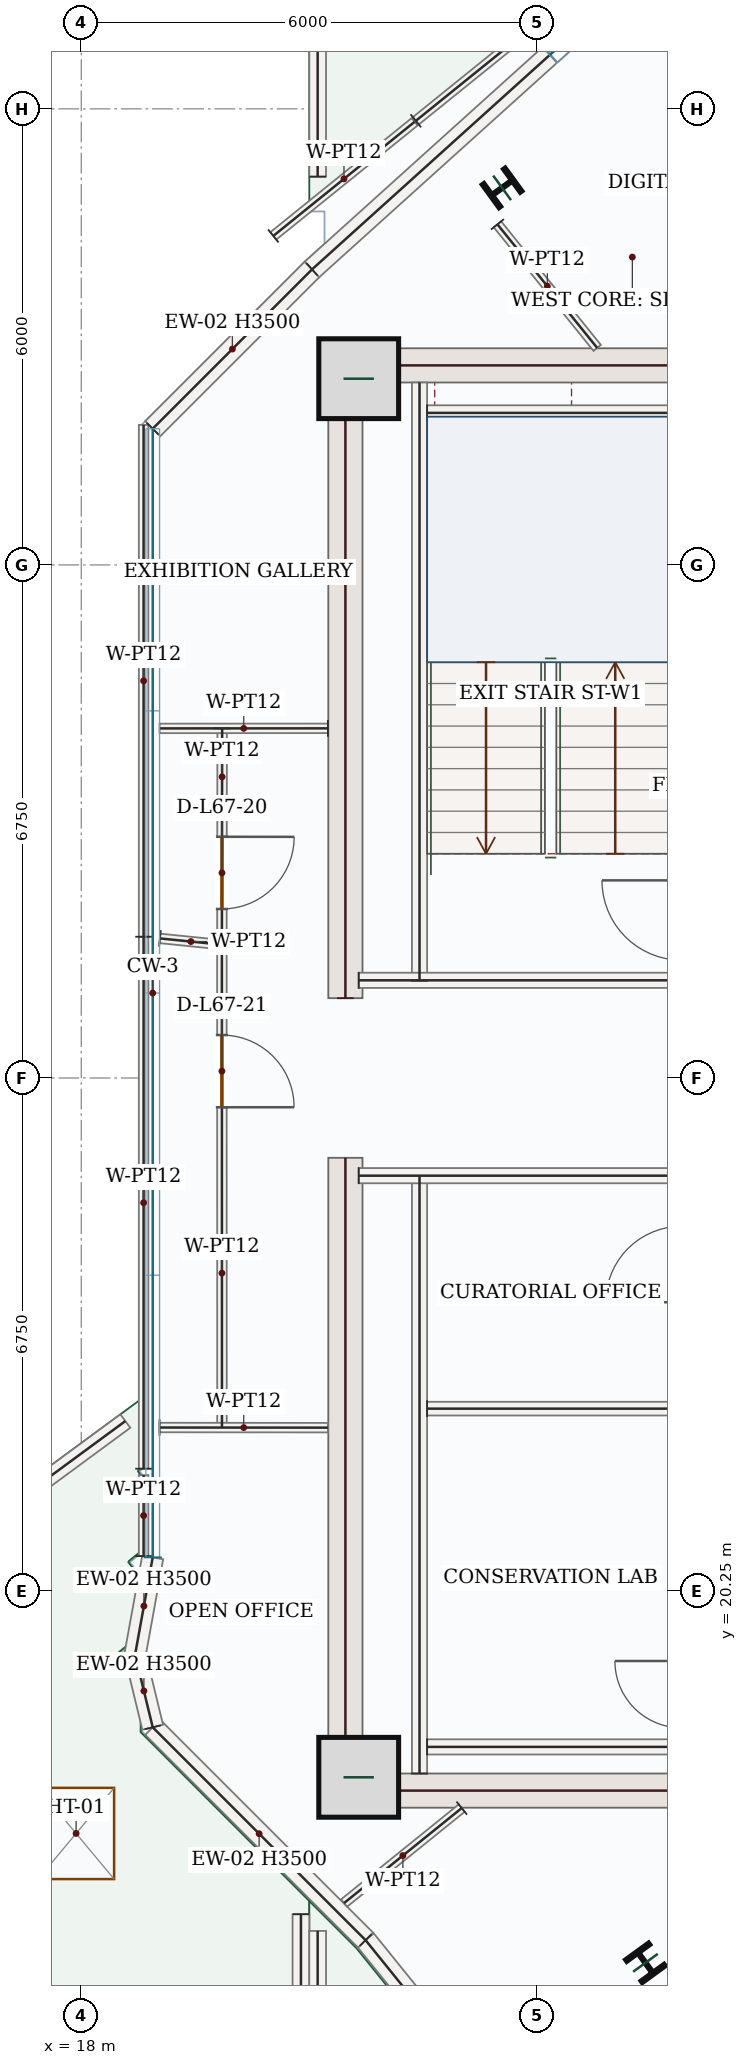
"""IFC4 building model, lengths in metres.
Left out: names, types, materials, properties, quantities, classifications, styles, units other than length and angle.
Written with IfcOpenShell. Run it as: python <this file> out.ifc"""

import sys

from ifc_helpers import new_model, si_unit, direction, frame, frame_2d, origin, origin_2d, place, context, subcontext, project, spatial, rectangle, i_section, extrude, source, transform, mapped, element, fill, save


model = new_model("IFC4")
c1 = context("Model", 3, precision=1e-05, world=origin(), true_north=direction((0.0, 1.0)))
c2 = subcontext(c1, "Body", "Model", "MODEL_VIEW")
j1 = project(units=[si_unit("LENGTHUNIT", "METRE"), si_unit("PLANEANGLEUNIT", "RADIAN")], contexts=[c1])
p1 = place(None, origin())
s1 = spatial("IfcSite", under=j1, at=p1, CompositionType="ELEMENT")
p2 = place(p1, origin())
s2 = spatial("IfcBuilding", under=s1, at=p2, CompositionType="ELEMENT")
p3 = place(p2, frame((0.0, 0.0, 280.35)))
s3 = spatial("IfcBuildingStorey", under=s2, at=p3, CompositionType="ELEMENT", Elevation=280.35)
m1 = source(origin(), c2, "Body", "SweptSolid", [
    extrude(rectangle(XDim=8.55, YDim=0.45, at=frame_2d((4.275, 0.0))), origin(), (0.0, 0.0, 1.0), 3.5),
])
for number, where, z_axis, x_axis in (
    (1, (21.475, 17.4, 0.0), (0.0, 0.0, 1.0), (0.0, 1.0, 0.0)),
    (2, (21.475, 28.05, 0.0), (0.0, 0.0, 1.0), (0.0, 1.0, 0.0)),
):
    element("IfcWall", number, at=place(p3, frame(where, z_axis=z_axis, x_axis=x_axis)), inside=s3, PredefinedType="SHEAR", context=c2, shape_type="MappedRepresentation", body=[
        mapped(m1, transform((0.0, 0.0, 0.0), x_axis=(1.0, 0.0, 0.0), y_axis=(0.0, 1.0, 0.0), z_axis=(0.0, 0.0, 1.0), scale=1.0)),
    ])
m2 = source(origin(), c2, "Body", "SweptSolid", [
    extrude(rectangle(XDim=7.1, YDim=0.45, at=frame_2d((3.55, 0.0))), origin(), (0.0, 0.0, 1.0), 3.5),
])
for number, where, z_axis, x_axis in (
    (3, (21.7, 17.625, 0.0), (0.0, 0.0, 1.0), (1.0, 0.0, 0.0)),
    (4, (21.7, 36.375, 0.0), (0.0, 0.0, 1.0), (1.0, 0.0, 0.0)),
):
    element("IfcWall", number, at=place(p3, frame(where, z_axis=z_axis, x_axis=x_axis)), inside=s3, PredefinedType="SHEAR", context=c2, shape_type="MappedRepresentation", body=[
        mapped(m2, transform((0.0, 0.0, 0.0), x_axis=(1.0, 0.0, 0.0), y_axis=(0.0, 1.0, 0.0), z_axis=(0.0, 0.0, 1.0), scale=1.0)),
    ])
m3 = source(origin(), c2, "Body", "SweptSolid", [
    extrude(rectangle(XDim=1.05, YDim=1.05, at=origin_2d()), origin(), (0.0, 0.0, 1.0), 3.75),
])
for number, where, z_axis, x_axis in (
    (5, (21.65, 17.8, 0.0), (0.0, 0.0, 1.0), (1.0, 0.0, 0.0)),
    (6, (21.65, 36.2, 0.0), (0.0, 0.0, 1.0), (1.0, 0.0, 0.0)),
):
    element("IfcColumn", number, at=place(p3, frame(where, z_axis=z_axis, x_axis=x_axis)), inside=s3, PredefinedType="COLUMN", context=c2, shape_type="MappedRepresentation", body=[
        mapped(m3, transform((0.0, 0.0, 0.0), x_axis=(1.0, 0.0, 0.0), y_axis=(0.0, 1.0, 0.0), z_axis=(0.0, 0.0, 1.0), scale=1.0)),
    ])
m4 = source(origin(), c2, "Body", "SweptSolid", [
    extrude(i_section(OverallWidth=0.374, OverallDepth=0.372, WebThickness=0.016, FlangeThickness=0.026, FilletRadius=0.018, at=origin_2d()), origin(), (0.0, 0.0, 1.0), 3.75),
])
for number, where, z_axis, x_axis in (
    (7, (23.536, 38.711, 0.0), (0.0, 0.0, 1.0), (-0.588, 0.809, 0.0)),
    (8, (25.422, 15.359, 0.0), (0.0, 0.0, 1.0), (0.809, 0.588, 0.0)),
):
    element("IfcColumn", number, at=place(p3, frame(where, z_axis=z_axis, x_axis=x_axis)), inside=s3, PredefinedType="COLUMN", context=c2, shape_type="MappedRepresentation", body=[
        mapped(m4, transform((0.0, 0.0, 0.0), x_axis=(1.0, 0.0, 0.0), y_axis=(0.0, 1.0, 0.0), z_axis=(0.0, 0.0, 1.0), scale=1.0)),
    ])
m5 = source(origin(), c2, "Body", "SweptSolid", [
    extrude(rectangle(XDim=3.37, YDim=0.22, at=frame_2d((1.685, 0.0))), origin(), (0.0, 0.0, 1.0), 1.2),
])
p4 = place(p3, frame((21.11, 38.858, 0.0), z_axis=(0.0, 0.0, 1.0), x_axis=(0.0, 1.0, 0.0)))
e9 = element("IfcWall", 9, at=p4, inside=s3, PredefinedType="PARAPET", context=c2, shape_type="MappedRepresentation", body=[
    mapped(m5, transform((0.0, 0.0, 0.0), x_axis=(1.0, 0.0, 0.0), y_axis=(0.0, 1.0, 0.0), z_axis=(0.0, 0.0, 1.0), scale=1.0)),
])
m6 = source(origin(), c2, "Body", "SweptSolid", [
    extrude(rectangle(XDim=5.736, YDim=0.22, at=frame_2d((2.868, 0.0))), origin(), (0.0, 0.0, 1.0), 1.2),
])
p5 = place(p3, frame((20.89, 15.999, 0.0), z_axis=(0.0, 0.0, 1.0), x_axis=(0.0, -1.0, 0.0)))
e10 = element("IfcWall", 10, at=p5, inside=s3, PredefinedType="PARAPET", context=c2, shape_type="MappedRepresentation", body=[
    mapped(m6, transform((0.0, 0.0, 0.0), x_axis=(1.0, 0.0, 0.0), y_axis=(0.0, 1.0, 0.0), z_axis=(0.0, 0.0, 1.0), scale=1.0)),
])
m7 = source(origin(), c2, "Body", "SweptSolid", [
    extrude(rectangle(XDim=9.514, YDim=0.22, at=frame_2d((4.757, 0.0))), origin(), (0.0, 0.0, 1.0), 1.2),
])
p6 = place(p3, frame((20.89, 10.263, 0.0), z_axis=(0.0, 0.0, 1.0), x_axis=(-0.592724500616, 0.805405280818, 0.0)))
e11 = element("IfcWall", 11, at=p6, inside=s3, PredefinedType="PARAPET", context=c2, shape_type="MappedRepresentation", body=[
    mapped(m7, transform((0.0, 0.0, 0.0), x_axis=(1.0, 0.0, 0.0), y_axis=(0.0, 1.0, 0.0), z_axis=(0.0, 0.0, 1.0), scale=1.0)),
])
m8 = source(origin(), c2, "Body", "SweptSolid", [
    extrude(rectangle(XDim=3.685, YDim=0.22, at=frame_2d((1.842, 0.0))), origin(), (0.0, 0.0, 1.0), 1.2),
])
p7 = place(p3, frame((15.612, 20.303, 0.0), z_axis=(0.0, 0.0, 1.0), x_axis=(0.805437043351, 0.592681338662, 0.0)))
e12 = element("IfcWall", 12, at=p7, inside=s3, PredefinedType="PARAPET", context=c2, shape_type="MappedRepresentation", body=[
    mapped(m8, transform((0.0, 0.0, 0.0), x_axis=(1.0, 0.0, 0.0), y_axis=(0.0, 1.0, 0.0), z_axis=(0.0, 0.0, 1.0), scale=1.0)),
])
m9 = source(origin(), c2, "Body", "SweptSolid", [
    extrude(rectangle(XDim=5.815, YDim=0.22, at=frame_2d((2.907, 0.0))), origin(), (0.0, 0.0, 1.0), 1.2),
])
p8 = place(p3, frame((21.11, 9.964, 0.0), z_axis=(0.0, 0.0, 1.0), x_axis=(0.0, 1.0, 0.0)))
e13 = element("IfcWall", 13, at=p8, inside=s3, PredefinedType="PARAPET", context=c2, shape_type="MappedRepresentation", body=[
    mapped(m9, transform((0.0, 0.0, 0.0), x_axis=(1.0, 0.0, 0.0), y_axis=(0.0, 1.0, 0.0), z_axis=(0.0, 0.0, 1.0), scale=1.0)),
])
m10 = source(origin(), c2, "Body", "SweptSolid", [
    extrude(rectangle(XDim=2.964, YDim=0.28, at=frame_2d((1.482, 0.0))), origin(), (0.0, 0.0, 1.0), 3.5),
])
p9 = place(p3, frame((18.94, 35.542, 0.0), z_axis=(0.0, 0.0, 1.0), x_axis=(0.707106781187, 0.707106781187, 0.0)))
e14 = element("IfcWall", 14, at=p9, inside=s3, PredefinedType="SOLIDWALL", context=c2, shape_type="MappedRepresentation", body=[
    mapped(m10, transform((0.0, 0.0, 0.0), x_axis=(1.0, 0.0, 0.0), y_axis=(0.0, 1.0, 0.0), z_axis=(0.0, 0.0, 1.0), scale=1.0)),
])
p10 = place(p3, frame((21.036, 37.638, 0.0), z_axis=(0.0, 0.0, 1.0), x_axis=(0.742587457262, 0.669749108486, 0.0)))
e15 = element("IfcWall", 15, at=p10, inside=s3, PredefinedType="SOLIDWALL", context=c2, shape_type="SweptSolid", body=[
    extrude(rectangle(XDim=9.935, YDim=0.28, at=frame_2d((4.967, 0.0))), origin(), (0.0, 0.0, 1.0), 3.5),
])
p11 = place(p10, frame((4.217, 0.0, 0.85)))
e16 = element("IfcOpeningElement", 16, at=p11, cuts=e15, PredefinedType="OPENING", context=c2, shape_type="SweptSolid", body=[
    extrude(rectangle(XDim=1.5, YDim=1.5, at=frame_2d((0.75, 0.75))), frame((0.0, 0.15, 0.0), z_axis=(0.0, -1.0, 0.0), x_axis=(1.0, 0.0, 0.0)), (0.0, 0.0, 1.0), 0.3),
])
m11 = source(origin(), c2, "Body", "SweptSolid", [
    extrude(rectangle(XDim=5.093, YDim=0.28, at=frame_2d((2.546, 0.0))), origin(), (0.0, 0.0, 1.0), 3.5),
])
p12 = place(p3, frame((24.94, 11.695, 0.0), z_axis=(0.0, 0.0, 1.0), x_axis=(-0.628225517447, 0.778031297075, 0.0)))
e17 = element("IfcWall", 17, at=p12, inside=s3, PredefinedType="SOLIDWALL", context=c2, shape_type="MappedRepresentation", body=[
    mapped(m11, transform((0.0, 0.0, 0.0), x_axis=(1.0, 0.0, 0.0), y_axis=(0.0, 1.0, 0.0), z_axis=(0.0, 0.0, 1.0), scale=1.0)),
])
m12 = source(origin(), c2, "Body", "SweptSolid", [
    extrude(rectangle(XDim=3.96, YDim=0.28, at=frame_2d((1.98, 0.0))), origin(), (0.0, 0.0, 1.0), 3.5),
])
p13 = place(p3, frame((21.74, 15.658, 0.0), z_axis=(0.0, 0.0, 1.0), x_axis=(-0.707106781187, 0.707106781187, 0.0)))
e18 = element("IfcWall", 18, at=p13, inside=s3, PredefinedType="SOLIDWALL", context=c2, shape_type="MappedRepresentation", body=[
    mapped(m12, transform((0.0, 0.0, 0.0), x_axis=(1.0, 0.0, 0.0), y_axis=(0.0, 1.0, 0.0), z_axis=(0.0, 0.0, 1.0), scale=1.0)),
])
m13 = source(origin(), c2, "Body", "SweptSolid", [
    extrude(rectangle(XDim=0.983, YDim=0.28, at=frame_2d((0.492, 0.0))), origin(), (0.0, 0.0, 1.0), 3.5),
])
p14 = place(p3, frame((18.94, 18.458, 0.0), z_axis=(0.0, 0.0, 1.0), x_axis=(-0.235870049888, 0.971784605541, 0.0)))
e19 = element("IfcWall", 19, at=p14, inside=s3, PredefinedType="SOLIDWALL", context=c2, shape_type="MappedRepresentation", body=[
    mapped(m13, transform((0.0, 0.0, 0.0), x_axis=(1.0, 0.0, 0.0), y_axis=(0.0, 1.0, 0.0), z_axis=(0.0, 0.0, 1.0), scale=1.0)),
])
m14 = source(origin(), c2, "Body", "SweptSolid", [
    extrude(rectangle(XDim=1.301, YDim=0.28, at=frame_2d((0.65, 0.0))), origin(), (0.0, 0.0, 1.0), 3.5),
])
p15 = place(p3, frame((18.708, 19.414, 0.0), z_axis=(0.0, 0.0, 1.0), x_axis=(0.178323782993, 0.983971863632, 0.0)))
e20 = element("IfcWall", 20, at=p15, inside=s3, PredefinedType="SOLIDWALL", context=c2, shape_type="MappedRepresentation", body=[
    mapped(m14, transform((0.0, 0.0, 0.0), x_axis=(1.0, 0.0, 0.0), y_axis=(0.0, 1.0, 0.0), z_axis=(0.0, 0.0, 1.0), scale=1.0)),
])
m15 = source(origin(), c2, "Body", "SweptSolid", [
    extrude(rectangle(XDim=7.87, YDim=0.2, at=frame_2d((3.935, 0.0))), origin(), (0.0, 0.0, 1.0), 3.5),
])
for number, where, z_axis, x_axis in (
    (21, (22.45, 17.85, 0.0), (0.0, 0.0, 1.0), (0.0, 1.0, 0.0)),
    (22, (22.45, 28.28, 0.0), (0.0, 0.0, 1.0), (0.0, 1.0, 0.0)),
):
    element("IfcWall", number, at=place(p3, frame(where, z_axis=z_axis, x_axis=x_axis)), inside=s3, PredefinedType="SOLIDWALL", context=c2, shape_type="MappedRepresentation", body=[
        mapped(m15, transform((0.0, 0.0, 0.0), x_axis=(1.0, 0.0, 0.0), y_axis=(0.0, 1.0, 0.0), z_axis=(0.0, 0.0, 1.0), scale=1.0)),
    ])
m16 = source(origin(), c2, "Body", "SweptSolid", [
    extrude(rectangle(XDim=4.25, YDim=0.2, at=frame_2d((2.125, 0.0))), origin(), (0.0, 0.0, 1.0), 3.5),
])
for number, where, z_axis, x_axis in (
    (23, (21.65, 25.715, 0.0), (0.0, 0.0, 1.0), (1.0, 0.0, 0.0)),
    (24, (21.65, 28.285, 0.0), (0.0, 0.0, 1.0), (1.0, 0.0, 0.0)),
):
    element("IfcWall", number, at=place(p3, frame(where, z_axis=z_axis, x_axis=x_axis)), inside=s3, PredefinedType="SOLIDWALL", context=c2, shape_type="MappedRepresentation", body=[
        mapped(m16, transform((0.0, 0.0, 0.0), x_axis=(1.0, 0.0, 0.0), y_axis=(0.0, 1.0, 0.0), z_axis=(0.0, 0.0, 1.0), scale=1.0)),
    ])
m17 = source(origin(), c2, "Body", "SweptSolid", [
    extrude(rectangle(XDim=3.25, YDim=0.2, at=frame_2d((1.625, 0.0))), origin(), (0.0, 0.0, 1.0), 3.5),
])
for number, where, z_axis, x_axis in (
    (25, (22.55, 35.75, 0.0), (0.0, 0.0, 1.0), (1.0, 0.0, 0.0)),
    (26, (22.55, 18.2, 0.0), (0.0, 0.0, 1.0), (1.0, 0.0, 0.0)),
):
    element("IfcWall", number, at=place(p3, frame(where, z_axis=z_axis, x_axis=x_axis)), inside=s3, PredefinedType="SOLIDWALL", context=c2, shape_type="MappedRepresentation", body=[
        mapped(m17, transform((0.0, 0.0, 0.0), x_axis=(1.0, 0.0, 0.0), y_axis=(0.0, 1.0, 0.0), z_axis=(0.0, 0.0, 1.0), scale=1.0)),
    ])
m18 = source(origin(), c2, "Body", "SweptSolid", [
    extrude(rectangle(XDim=3.25, YDim=0.18, at=frame_2d((1.625, 0.0))), origin(), (0.0, 0.0, 1.0), 3.5),
])
p16 = place(p3, frame((22.55, 22.65, 0.0), z_axis=(0.0, 0.0, 1.0), x_axis=(1.0, 0.0, 0.0)))
e27 = element("IfcWall", 27, at=p16, inside=s3, PredefinedType="PARTITIONING", context=c2, shape_type="MappedRepresentation", body=[
    mapped(m18, transform((0.0, 0.0, 0.0), x_axis=(1.0, 0.0, 0.0), y_axis=(0.0, 1.0, 0.0), z_axis=(0.0, 0.0, 1.0), scale=1.0)),
])
p17 = place(p3, frame((19.85, 28.754, 0.0), z_axis=(0.0, 0.0, 1.0), x_axis=(0.000153721992, -0.999999988185, 0.0)))
e28 = element("IfcWall", 28, at=p17, inside=s3, PredefinedType="PARTITIONING", context=c2, shape_type="SweptSolid", body=[
    extrude(rectangle(XDim=6.353, YDim=0.125, at=frame_2d((3.176, 0.0))), origin(), (0.0, 0.0, 1.0), 3.5),
])
p18 = place(p17, frame((1.189, 0.0, 0.0)))
e29 = element("IfcOpeningElement", 29, at=p18, cuts=e28, PredefinedType="OPENING", context=c2, shape_type="SweptSolid", body=[
    extrude(rectangle(XDim=0.95, YDim=2.15, at=frame_2d((0.475, 1.075))), frame((0.0, 0.073, 0.0), z_axis=(0.0, -1.0, 0.0), x_axis=(1.0, 0.0, 0.0)), (0.0, 0.0, 1.0), 0.145),
])
m19 = source(origin(), c2, "Body", "SweptSolid", [
    extrude(rectangle(XDim=2.215, YDim=0.125, at=frame_2d((1.107, 0.0))), origin(), (0.0, 0.0, 1.0), 3.5),
])
p19 = place(p3, frame((19.03, 22.402, 0.0), z_axis=(0.0, 0.0, 1.0), x_axis=(0.999999702379, -0.000771519665, 0.0)))
e30 = element("IfcWall", 30, at=p19, inside=s3, PredefinedType="PARTITIONING", context=c2, shape_type="MappedRepresentation", body=[
    mapped(m19, transform((0.0, 0.0, 0.0), x_axis=(1.0, 0.0, 0.0), y_axis=(0.0, 1.0, 0.0), z_axis=(0.0, 0.0, 1.0), scale=1.0)),
])
m20 = source(origin(), c2, "Body", "SweptSolid", [
    extrude(rectangle(XDim=1.989, YDim=0.125, at=frame_2d((0.995, 0.0))), origin(), (0.0, 0.0, 1.0), 3.5),
])
p20 = place(p3, frame((23.005, 17.395, 0.0), z_axis=(0.0, 0.0, 1.0), x_axis=(-0.778058853423, -0.628191388519, 0.0)))
e31 = element("IfcWall", 31, at=p20, inside=s3, PredefinedType="PARTITIONING", context=c2, shape_type="MappedRepresentation", body=[
    mapped(m20, transform((0.0, 0.0, 0.0), x_axis=(1.0, 0.0, 0.0), y_axis=(0.0, 1.0, 0.0), z_axis=(0.0, 0.0, 1.0), scale=1.0)),
])
m21 = source(origin(), c2, "Body", "SweptSolid", [
    extrude(rectangle(XDim=1.066, YDim=0.125, at=frame_2d((0.533, 0.0))), origin(), (0.0, 0.0, 1.0), 3.5),
])
p21 = place(p3, frame((18.82, 20.71, 0.0), z_axis=(0.0, 0.0, 1.0), x_axis=(0.0, 1.0, 0.0)))
e32 = element("IfcWall", 32, at=p21, inside=s3, PredefinedType="PARTITIONING", context=c2, shape_type="MappedRepresentation", body=[
    mapped(m21, transform((0.0, 0.0, 0.0), x_axis=(1.0, 0.0, 0.0), y_axis=(0.0, 1.0, 0.0), z_axis=(0.0, 0.0, 1.0), scale=1.0)),
])
m22 = source(origin(), c2, "Body", "SweptSolid", [
    extrude(rectangle(XDim=6.999, YDim=0.125, at=frame_2d((3.499, 0.0))), origin(), (0.0, 0.0, 1.0), 3.5),
])
p22 = place(p3, frame((18.82, 21.86, 0.0), z_axis=(0.0, 0.0, 1.0), x_axis=(0.0, 1.0, 0.0)))
e33 = element("IfcWall", 33, at=p22, inside=s3, PredefinedType="PARTITIONING", context=c2, shape_type="MappedRepresentation", body=[
    mapped(m22, transform((0.0, 0.0, 0.0), x_axis=(1.0, 0.0, 0.0), y_axis=(0.0, 1.0, 0.0), z_axis=(0.0, 0.0, 1.0), scale=1.0)),
])
m23 = source(origin(), c2, "Body", "SweptSolid", [
    extrude(rectangle(XDim=0.819, YDim=0.125, at=frame_2d((0.41, 0.0))), origin(), (0.0, 0.0, 1.0), 3.5),
])
p23 = place(p3, frame((19.035, 28.836, 0.0), z_axis=(0.0, 0.0, 1.0), x_axis=(0.994885598115, -0.101008151471, 0.0)))
e34 = element("IfcWall", 34, at=p23, inside=s3, PredefinedType="PARTITIONING", context=c2, shape_type="MappedRepresentation", body=[
    mapped(m23, transform((0.0, 0.0, 0.0), x_axis=(1.0, 0.0, 0.0), y_axis=(0.0, 1.0, 0.0), z_axis=(0.0, 0.0, 1.0), scale=1.0)),
])
p24 = place(p3, frame((19.854, 31.6, 0.0), z_axis=(0.0, 0.0, 1.0), x_axis=(-0.00123022754, -0.99999924327, 0.0)))
e35 = element("IfcWall", 35, at=p24, inside=s3, PredefinedType="PARTITIONING", context=c2, shape_type="SweptSolid", body=[
    extrude(rectangle(XDim=2.778, YDim=0.125, at=frame_2d((1.389, 0.0))), origin(), (0.0, 0.0, 1.0), 3.5),
])
p25 = place(p24, frame((1.426, 0.0, 0.0)))
e36 = element("IfcOpeningElement", 36, at=p25, cuts=e35, PredefinedType="OPENING", context=c2, shape_type="SweptSolid", body=[
    extrude(rectangle(XDim=0.95, YDim=2.15, at=frame_2d((0.475, 1.075))), frame((0.0, 0.073, 0.0), z_axis=(0.0, -1.0, 0.0), x_axis=(1.0, 0.0, 0.0)), (0.0, 0.0, 1.0), 0.145),
])
m24 = source(origin(), c2, "Body", "SweptSolid", [
    extrude(rectangle(XDim=6.734, YDim=0.125, at=frame_2d((3.367, 0.0))), origin(), (0.0, 0.0, 1.0), 3.5),
])
p26 = place(p3, frame((18.82, 28.858, 0.0), z_axis=(0.0, 0.0, 1.0), x_axis=(0.0, 1.0, 0.0)))
e37 = element("IfcWall", 37, at=p26, inside=s3, PredefinedType="PARTITIONING", context=c2, shape_type="MappedRepresentation", body=[
    mapped(m24, transform((0.0, 0.0, 0.0), x_axis=(1.0, 0.0, 0.0), y_axis=(0.0, 1.0, 0.0), z_axis=(0.0, 0.0, 1.0), scale=1.0)),
])
m25 = source(origin(), c2, "Body", "SweptSolid", [
    extrude(rectangle(XDim=2.39, YDim=0.125, at=frame_2d((1.195, 0.0))), origin(), (0.0, 0.0, 1.0), 3.5),
])
p27 = place(p3, frame((20.527, 38.078, 0.0), z_axis=(0.0, 0.0, 1.0), x_axis=(0.778010315123, 0.628251501839, 0.0)))
e38 = element("IfcWall", 38, at=p27, inside=s3, PredefinedType="PARTITIONING", context=c2, shape_type="MappedRepresentation", body=[
    mapped(m25, transform((0.0, 0.0, 0.0), x_axis=(1.0, 0.0, 0.0), y_axis=(0.0, 1.0, 0.0), z_axis=(0.0, 0.0, 1.0), scale=1.0)),
])
m26 = source(origin(), c2, "Body", "SweptSolid", [
    extrude(rectangle(XDim=2.089, YDim=0.125, at=frame_2d((1.045, 0.0))), origin(), (0.0, 0.0, 1.0), 3.5),
])
p28 = place(p3, frame((23.475, 38.231, 0.0), z_axis=(0.0, 0.0, 1.0), x_axis=(0.628165745158, -0.778079556735, 0.0)))
e39 = element("IfcWall", 39, at=p28, inside=s3, PredefinedType="PARTITIONING", context=c2, shape_type="MappedRepresentation", body=[
    mapped(m26, transform((0.0, 0.0, 0.0), x_axis=(1.0, 0.0, 0.0), y_axis=(0.0, 1.0, 0.0), z_axis=(0.0, 0.0, 1.0), scale=1.0)),
])
p29 = place(p3, frame((21.245, 31.6, 0.0), z_axis=(0.0, 0.0, 1.0), x_axis=(-0.999999902817, -0.000440868468, 0.0)))
e40 = element("IfcWall", 40, at=p29, inside=s3, PredefinedType="PARTITIONING", context=c2, shape_type="MappedRepresentation", body=[
    mapped(m19, transform((0.0, 0.0, 0.0), x_axis=(1.0, 0.0, 0.0), y_axis=(0.0, 1.0, 0.0), z_axis=(0.0, 0.0, 1.0), scale=1.0)),
])
m27 = source(origin(), c2, "Body", "SweptSolid", [
    extrude(rectangle(XDim=4.72, YDim=0.125, at=frame_2d((2.36, 0.0))), origin(), (0.0, 0.0, 1.0), 3.5),
])
p30 = place(p3, frame((22.402, 39.592, 0.0), z_axis=(0.0, 0.0, 1.0), x_axis=(0.778024801452, 0.628233561922, 0.0)))
e41 = element("IfcWall", 41, at=p30, inside=s3, PredefinedType="PARTITIONING", context=c2, shape_type="MappedRepresentation", body=[
    mapped(m27, transform((0.0, 0.0, 0.0), x_axis=(1.0, 0.0, 0.0), y_axis=(0.0, 1.0, 0.0), z_axis=(0.0, 0.0, 1.0), scale=1.0)),
])
p31 = place(p3, frame((0.0, 0.0, -0.22)))
p32 = place(p31, frame((17.932, 17.061, 0.0)))
p33 = place(p32, frame((0.0, 0.0, 0.22)))
e42 = element("IfcDoor", 42, at=p33, inside=s3, OperationType="SINGLE_SWING_LEFT", PredefinedType="TRAPDOOR", context=c2, shape_type="SweptSolid", body=[
    extrude(rectangle(XDim=1.0, YDim=1.2, at=origin_2d()), origin(), (0.0, 0.0, 1.0), 0.05),
])
m28 = source(origin(), c2, "Body", "SweptSolid", [
    extrude(rectangle(XDim=1.5, YDim=1.5, at=frame_2d((0.75, 0.75))), frame((0.0, 0.03, 0.0), z_axis=(0.0, -1.0, 0.0), x_axis=(1.0, 0.0, 0.0)), (0.0, 0.0, 1.0), 0.06),
])
p34 = place(p11, origin())
e43 = element("IfcWindow", 43, at=p34, inside=s3, PartitioningType="SINGLE_PANEL", PredefinedType="WINDOW", context=c2, shape_type="MappedRepresentation", body=[
    mapped(m28, transform((0.0, 0.0, 0.0), x_axis=(1.0, 0.0, 0.0), y_axis=(0.0, 1.0, 0.0), z_axis=(0.0, 0.0, 1.0), scale=1.0)),
])
fill(e16, e43)
m29 = source(origin(), c2, "Body", "SweptSolid", [
    extrude(rectangle(XDim=0.95, YDim=2.15, at=frame_2d((0.475, 1.075))), frame((0.0, 0.025, 0.0), z_axis=(0.0, -1.0, 0.0), x_axis=(1.0, 0.0, 0.0)), (0.0, 0.0, 1.0), 0.05),
])
p35 = place(p25, origin())
e44 = element("IfcDoor", 44, at=p35, inside=s3, OperationType="SINGLE_SWING_LEFT", PredefinedType="DOOR", context=c2, shape_type="MappedRepresentation", body=[
    mapped(m29, transform((0.0, 0.0, 0.0), x_axis=(1.0, 0.0, 0.0), y_axis=(0.0, 1.0, 0.0), z_axis=(0.0, 0.0, 1.0), scale=1.0)),
])
fill(e36, e44)
p36 = place(p18, origin())
e45 = element("IfcDoor", 45, at=p36, inside=s3, OperationType="SINGLE_SWING_RIGHT", PredefinedType="DOOR", context=c2, shape_type="MappedRepresentation", body=[
    mapped(m29, transform((0.0, 0.0, 0.0), x_axis=(1.0, 0.0, 0.0), y_axis=(0.0, 1.0, 0.0), z_axis=(0.0, 0.0, 1.0), scale=1.0)),
])
fill(e29, e45)
save(model, sys.argv[1])
